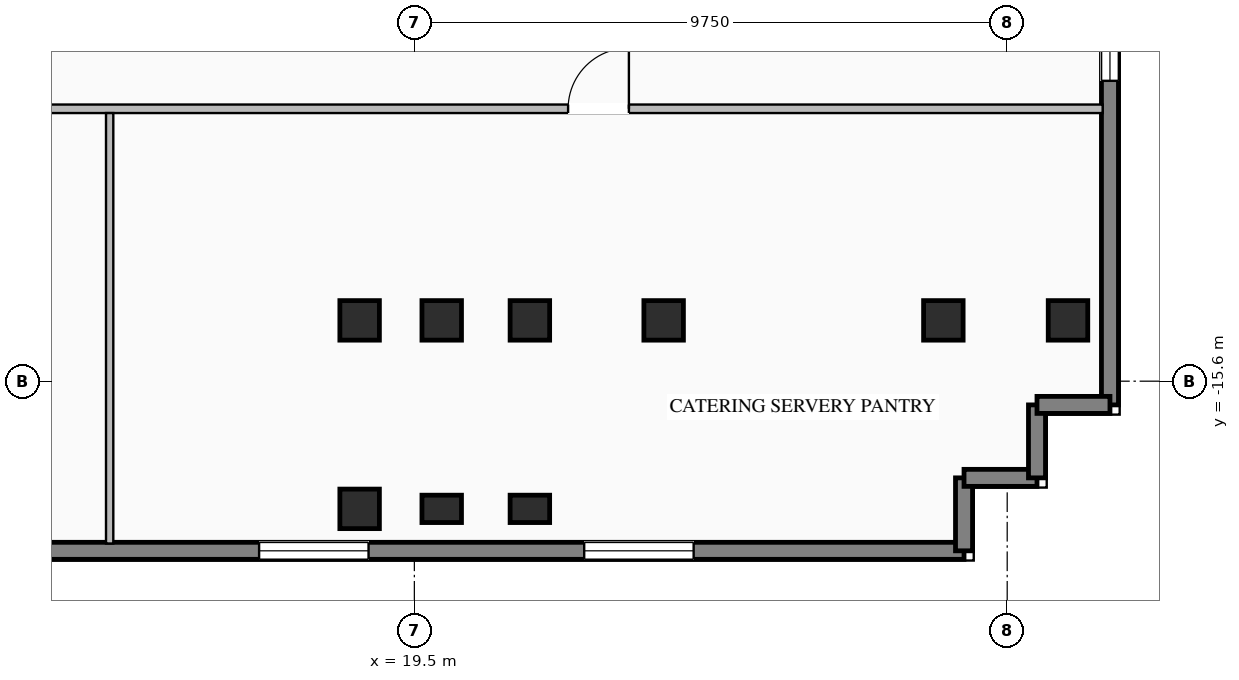
"""IFC4 building model, lengths in metres.
Left out: names, types, materials, properties, quantities, classifications, styles, units other than length and angle.
Written with IfcOpenShell. Run it as: python <this file> out.ifc"""

import sys

from ifc_helpers import new_model, si_unit, direction, frame, frame_2d, origin, origin_2d, place, context, subcontext, project, spatial, rectangle, i_section, extrude, element, fill, save


model = new_model("IFC4")
c1 = context("Model", 3, precision=1e-05, world=origin(), true_north=direction((0.0, 1.0)))
c2 = subcontext(c1, "Body", "Model", "MODEL_VIEW")
j1 = project(units=[si_unit("LENGTHUNIT", "METRE"), si_unit("PLANEANGLEUNIT", "RADIAN")], contexts=[c1])
p1 = place(None, origin())
s1 = spatial("IfcSite", under=j1, at=p1, CompositionType="ELEMENT")
p2 = place(p1, origin())
s2 = spatial("IfcBuilding", under=s1, at=p2, CompositionType="ELEMENT")
p3 = place(p2, frame((0.0, 0.0, 120.85)))
s3 = spatial("IfcBuildingStorey", under=s2, at=p3, CompositionType="ELEMENT", Elevation=120.85)
for number, where, z_axis, x_axis in (
    (1, (18.6, -14.6, 0.0), (0.0, 0.0, 1.0), (1.0, 0.0, 0.0)),
    (2, (19.95, -14.6, 0.0), (0.0, 0.0, 1.0), (1.0, 0.0, 0.0)),
    (3, (21.4, -14.6, 0.0), (0.0, 0.0, 1.0), (1.0, 0.0, 0.0)),
    (4, (23.6, -14.6, 0.0), (0.0, 0.0, 1.0), (1.0, 0.0, 0.0)),
    (5, (28.2, -14.6, 0.0), (0.0, 0.0, 1.0), (1.0, 0.0, 0.0)),
    (6, (18.6, -17.7, 0.0), (0.0, 0.0, 1.0), (1.0, 0.0, 0.0)),
    (7, (30.25, -14.6, 0.0), (0.0, 0.0, 1.0), (1.0, 0.0, 0.0)),
):
    element("IfcColumn", number, at=place(p3, frame(where, z_axis=z_axis, x_axis=x_axis)), inside=s3, PredefinedType="COLUMN", context=c2, shape_type="SweptSolid", body=[
        extrude(i_section(OverallWidth=0.65, OverallDepth=0.65, WebThickness=0.028, FlangeThickness=0.04, at=origin_2d()), origin(), (0.0, 0.0, 1.0), 3.45),
    ])
for number, where, z_axis, x_axis in (
    (8, (19.95, -17.7, 0.0), (0.0, 0.0, 1.0), (1.0, 0.0, 0.0)),
    (9, (21.4, -17.7, 0.0), (0.0, 0.0, 1.0), (1.0, 0.0, 0.0)),
):
    element("IfcColumn", number, at=place(p3, frame(where, z_axis=z_axis, x_axis=x_axis)), inside=s3, PredefinedType="PILASTER", context=c2, shape_type="SweptSolid", body=[
        extrude(rectangle(XDim=0.65, YDim=0.45, at=origin_2d()), origin(), (0.0, 0.0, 1.0), 3.45),
    ])
p4 = place(p3, frame((28.54, -18.39, 0.0), z_axis=(0.0, 0.0, 1.0), x_axis=(-1.0, 0.0, 0.0)))
e10 = element("IfcWall", 10, at=p4, inside=s3, PredefinedType="STANDARD", context=c2, shape_type="SweptSolid", body=[
    extrude(rectangle(XDim=16.04, YDim=0.28, at=frame_2d((8.02, 0.0))), origin(), (0.0, 0.0, 1.0), 3.25),
])
p5 = place(p4, frame((4.447, 0.0, 0.76)))
e11 = element("IfcOpeningElement", 11, at=p5, cuts=e10, PredefinedType="OPENING", context=c2, shape_type="SweptSolid", body=[
    extrude(rectangle(XDim=1.8, YDim=1.95, at=frame_2d((0.9, 0.975))), frame((0.0, 0.15, 0.0), z_axis=(0.0, -1.0, 0.0), x_axis=(1.0, 0.0, 0.0)), (0.0, 0.0, 1.0), 0.3),
])
p6 = place(p4, frame((9.793, 0.0, 0.76)))
e12 = element("IfcOpeningElement", 12, at=p6, cuts=e10, PredefinedType="OPENING", context=c2, shape_type="SweptSolid", body=[
    extrude(rectangle(XDim=1.8, YDim=1.95, at=frame_2d((0.9, 0.975))), frame((0.0, 0.15, 0.0), z_axis=(0.0, -1.0, 0.0), x_axis=(1.0, 0.0, 0.0)), (0.0, 0.0, 1.0), 0.3),
])
p7 = place(p3, frame((30.94, 1.8, 0.0), z_axis=(0.0, 0.0, 1.0), x_axis=(0.0, -1.0, 0.0)))
e13 = element("IfcWall", 13, at=p7, inside=s3, PredefinedType="STANDARD", context=c2, shape_type="SweptSolid", body=[
    extrude(rectangle(XDim=17.79, YDim=0.28, at=frame_2d((8.895, 0.0))), origin(), (0.0, 0.0, 1.0), 3.25),
])
p8 = place(p7, frame((5.33, 0.0, 0.76)))
e14 = element("IfcOpeningElement", 14, at=p8, cuts=e13, PredefinedType="OPENING", context=c2, shape_type="SweptSolid", body=[
    extrude(rectangle(XDim=1.2, YDim=1.95, at=frame_2d((0.6, 0.975))), frame((0.0, 0.15, 0.0), z_axis=(0.0, -1.0, 0.0), x_axis=(1.0, 0.0, 0.0)), (0.0, 0.0, 1.0), 0.3),
])
p9 = place(p7, frame((11.26, 0.0, 0.76)))
e15 = element("IfcOpeningElement", 15, at=p9, cuts=e13, PredefinedType="OPENING", context=c2, shape_type="SweptSolid", body=[
    extrude(rectangle(XDim=1.2, YDim=1.95, at=frame_2d((0.6, 0.975))), frame((0.0, 0.15, 0.0), z_axis=(0.0, -1.0, 0.0), x_axis=(1.0, 0.0, 0.0)), (0.0, 0.0, 1.0), 0.3),
])
for number, where, z_axis, x_axis in (
    (16, (28.54, -18.39, 0.0), (0.0, 0.0, 1.0), (0.0, 1.0, 0.0)),
    (17, (28.54, -17.19, 0.0), (0.0, 0.0, 1.0), (1.0, 0.0, 0.0)),
    (18, (29.74, -17.19, 0.0), (0.0, 0.0, 1.0), (0.0, 1.0, 0.0)),
    (19, (29.74, -15.99, 0.0), (0.0, 0.0, 1.0), (1.0, 0.0, 0.0)),
):
    element("IfcWall", number, at=place(p3, frame(where, z_axis=z_axis, x_axis=x_axis)), inside=s3, PredefinedType="STANDARD", context=c2, shape_type="SweptSolid", body=[
        extrude(rectangle(XDim=1.2, YDim=0.28, at=frame_2d((0.6, 0.0))), origin(), (0.0, 0.0, 1.0), 3.25),
    ])
p10 = place(p3, frame((-32.82, -11.12, 0.0), z_axis=(0.0, 0.0, 1.0), x_axis=(1.0, 0.0, 0.0)))
e20 = element("IfcWall", 20, at=p10, inside=s3, PredefinedType="STANDARD", context=c2, shape_type="SweptSolid", body=[
    extrude(rectangle(XDim=63.64, YDim=0.14, at=frame_2d((31.82, 0.0))), origin(), (0.0, 0.0, 1.0), 3.25),
])
p11 = place(p10, frame((19.91, 0.0, 0.0)))
e21 = element("IfcOpeningElement", 21, at=p11, cuts=e20, PredefinedType="OPENING", context=c2, shape_type="SweptSolid", body=[
    extrude(rectangle(XDim=0.92, YDim=2.08, at=frame_2d((0.46, 1.04))), frame((0.0, 0.08, 0.0), z_axis=(0.0, -1.0, 0.0), x_axis=(1.0, 0.0, 0.0)), (0.0, 0.0, 1.0), 0.16),
])
p12 = place(p10, frame((23.41, 0.0, 0.0)))
e22 = element("IfcOpeningElement", 22, at=p12, cuts=e20, PredefinedType="OPENING", context=c2, shape_type="SweptSolid", body=[
    extrude(rectangle(XDim=0.92, YDim=2.08, at=frame_2d((0.46, 1.04))), frame((0.0, 0.08, 0.0), z_axis=(0.0, -1.0, 0.0), x_axis=(1.0, 0.0, 0.0)), (0.0, 0.0, 1.0), 0.16),
])
p13 = place(p10, frame((26.26, 0.0, 0.0)))
e23 = element("IfcOpeningElement", 23, at=p13, cuts=e20, PredefinedType="OPENING", context=c2, shape_type="SweptSolid", body=[
    extrude(rectangle(XDim=0.92, YDim=2.08, at=frame_2d((0.46, 1.04))), frame((0.0, 0.08, 0.0), z_axis=(0.0, -1.0, 0.0), x_axis=(1.0, 0.0, 0.0)), (0.0, 0.0, 1.0), 0.16),
])
p14 = place(p10, frame((4.713, 0.0, 0.0)))
e24 = element("IfcOpeningElement", 24, at=p14, cuts=e20, PredefinedType="OPENING", context=c2, shape_type="SweptSolid", body=[
    extrude(rectangle(XDim=1.0, YDim=2.08, at=frame_2d((0.5, 1.04))), frame((0.0, 0.08, 0.0), z_axis=(0.0, -1.0, 0.0), x_axis=(1.0, 0.0, 0.0)), (0.0, 0.0, 1.0), 0.16),
])
p15 = place(p10, frame((13.897, 0.0, 0.0)))
e25 = element("IfcOpeningElement", 25, at=p15, cuts=e20, PredefinedType="OPENING", context=c2, shape_type="SweptSolid", body=[
    extrude(rectangle(XDim=1.0, YDim=2.08, at=frame_2d((0.5, 1.04))), frame((0.0, 0.08, 0.0), z_axis=(0.0, -1.0, 0.0), x_axis=(1.0, 0.0, 0.0)), (0.0, 0.0, 1.0), 0.16),
])
p16 = place(p10, frame((37.064, 0.0, 0.0)))
e26 = element("IfcOpeningElement", 26, at=p16, cuts=e20, PredefinedType="OPENING", context=c2, shape_type="SweptSolid", body=[
    extrude(rectangle(XDim=1.0, YDim=2.08, at=frame_2d((0.5, 1.04))), frame((0.0, 0.08, 0.0), z_axis=(0.0, -1.0, 0.0), x_axis=(1.0, 0.0, 0.0)), (0.0, 0.0, 1.0), 0.16),
])
p17 = place(p10, frame((54.848, 0.0, 0.0)))
e27 = element("IfcOpeningElement", 27, at=p17, cuts=e20, PredefinedType="OPENING", context=c2, shape_type="SweptSolid", body=[
    extrude(rectangle(XDim=1.0, YDim=2.08, at=frame_2d((0.5, 1.04))), frame((0.0, 0.08, 0.0), z_axis=(0.0, -1.0, 0.0), x_axis=(1.0, 0.0, 0.0)), (0.0, 0.0, 1.0), 0.16),
])
p18 = place(p3, frame((14.489, -18.27, 0.0), z_axis=(0.0, 0.0, 1.0), x_axis=(0.0, 1.0, 0.0)))
e28 = element("IfcWall", 28, at=p18, inside=s3, PredefinedType="STANDARD", context=c2, shape_type="SweptSolid", body=[
    extrude(rectangle(XDim=7.08, YDim=0.12, at=frame_2d((3.54, 0.0))), origin(), (0.0, 0.0, 1.0), 3.25),
])
p19 = place(p5, origin())
e29 = element("IfcWindow", 29, at=p19, inside=s3, PartitioningType="SINGLE_PANEL", PredefinedType="WINDOW", context=c2, shape_type="SweptSolid", body=[
    extrude(rectangle(XDim=1.8, YDim=1.95, at=frame_2d((0.9, 0.975))), frame((0.0, 0.03, 0.0), z_axis=(0.0, -1.0, 0.0), x_axis=(1.0, 0.0, 0.0)), (0.0, 0.0, 1.0), 0.06),
])
fill(e11, e29)
p20 = place(p6, origin())
e30 = element("IfcWindow", 30, at=p20, inside=s3, PartitioningType="SINGLE_PANEL", PredefinedType="WINDOW", context=c2, shape_type="SweptSolid", body=[
    extrude(rectangle(XDim=1.8, YDim=1.95, at=frame_2d((0.9, 0.975))), frame((0.0, 0.03, 0.0), z_axis=(0.0, -1.0, 0.0), x_axis=(1.0, 0.0, 0.0)), (0.0, 0.0, 1.0), 0.06),
])
fill(e12, e30)
p21 = place(p9, origin())
e31 = element("IfcWindow", 31, at=p21, inside=s3, PartitioningType="SINGLE_PANEL", PredefinedType="WINDOW", context=c2, shape_type="SweptSolid", body=[
    extrude(rectangle(XDim=1.2, YDim=1.95, at=frame_2d((0.6, 0.975))), frame((0.0, 0.03, 0.0), z_axis=(0.0, -1.0, 0.0), x_axis=(1.0, 0.0, 0.0)), (0.0, 0.0, 1.0), 0.06),
])
fill(e15, e31)
p22 = place(p17, origin())
e32 = element("IfcDoor", 32, at=p22, inside=s3, OperationType="SINGLE_SWING_RIGHT", PredefinedType="DOOR", context=c2, shape_type="SweptSolid", body=[
    extrude(rectangle(XDim=1.0, YDim=2.08, at=frame_2d((0.5, 1.04))), frame((0.0, 0.025, 0.0), z_axis=(0.0, -1.0, 0.0), x_axis=(1.0, 0.0, 0.0)), (0.0, 0.0, 1.0), 0.05),
])
fill(e27, e32)
save(model, sys.argv[1])
